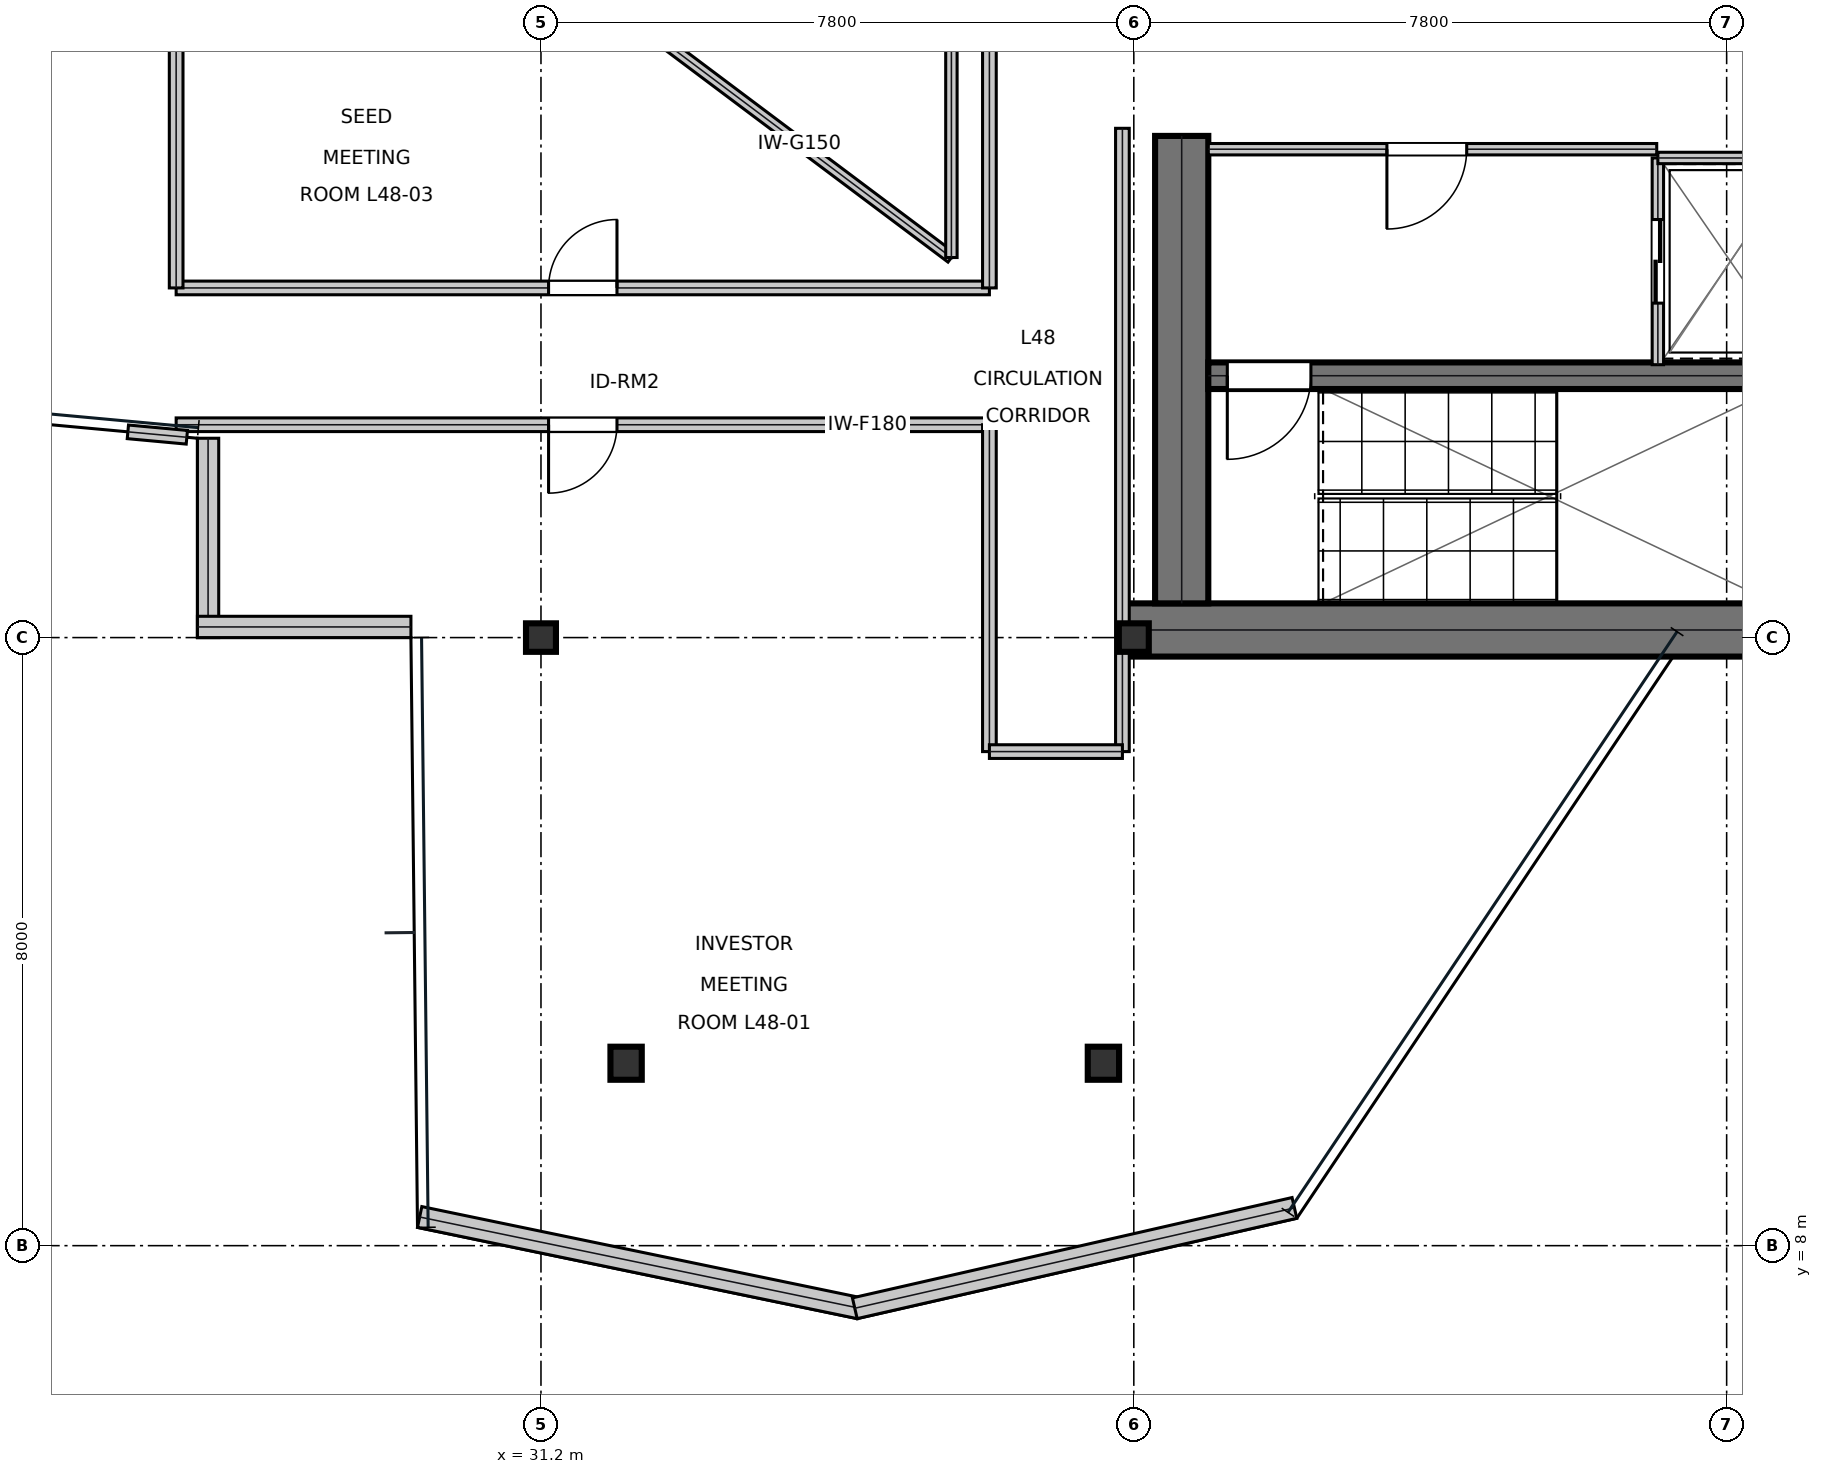
"""IFC4 building model, lengths in metres.
Left out: names, types, materials, properties, quantities, classifications, styles, units other than length and angle.
Written with IfcOpenShell. Run it as: python <this file> out.ifc"""

import sys

from ifc_helpers import new_model, si_unit, direction, frame, frame_2d, origin, origin_2d, place, context, subcontext, project, spatial, rectangle, i_section, extrude, element, fill, save


model = new_model("IFC4")
c1 = context("Model", 3, precision=1e-05, world=origin(), true_north=direction((0.0, 1.0)))
c2 = subcontext(c1, "Body", "Model", "MODEL_VIEW")
j1 = project(units=[si_unit("LENGTHUNIT", "METRE"), si_unit("PLANEANGLEUNIT", "RADIAN")], contexts=[c1])
p1 = place(None, origin())
s1 = spatial("IfcSite", under=j1, at=p1, CompositionType="ELEMENT")
p2 = place(p1, origin())
s2 = spatial("IfcBuilding", under=s1, at=p2, CompositionType="ELEMENT")
p3 = place(p2, frame((0.0, 0.0, 208.05)))
s3 = spatial("IfcBuildingStorey", under=s2, at=p3, CompositionType="ELEMENT", Elevation=208.05)
p4 = place(p3, frame((38.8, 16.1, 0.0), z_axis=(0.0, 0.0, 1.0), x_axis=(1.0, 0.0, 0.0)))
e1 = element("IfcWall", 1, at=p4, inside=s3, PredefinedType="SHEAR", context=c2, shape_type="SweptSolid", body=[
    extrude(rectangle(XDim=16.0, YDim=0.7, at=frame_2d((8.0, 0.0))), origin(), (0.0, 0.0, 1.0), 3.79),
])
p5 = place(p3, frame((39.63, 16.45, 0.0), z_axis=(0.0, 0.0, 1.0), x_axis=(0.0, 1.0, 0.0)))
e2 = element("IfcWall", 2, at=p5, inside=s3, PredefinedType="SHEAR", context=c2, shape_type="SweptSolid", body=[
    extrude(rectangle(XDim=6.15, YDim=0.7, at=frame_2d((3.075, 0.0))), origin(), (0.0, 0.0, 1.0), 3.79),
])
p6 = place(p3, frame((39.98, 19.445, 0.0), z_axis=(0.0, 0.0, 1.0), x_axis=(1.0, 0.0, 0.0)))
e3 = element("IfcWall", 3, at=p6, inside=s3, PredefinedType="SHEAR", context=c2, shape_type="SweptSolid", body=[
    extrude(rectangle(XDim=7.71, YDim=0.35, at=frame_2d((3.855, 0.0))), origin(), (0.0, 0.0, 1.0), 3.79),
])
p7 = place(p6, frame((0.25, 0.0, 0.0)))
e4 = element("IfcOpeningElement", 4, at=p7, cuts=e3, PredefinedType="OPENING", context=c2, shape_type="SweptSolid", body=[
    extrude(rectangle(XDim=1.1, YDim=2.15, at=frame_2d((0.55, 1.075))), frame((0.0, 0.185, 0.0), z_axis=(0.0, -1.0, 0.0), x_axis=(1.0, 0.0, 0.0)), (0.0, 0.0, 1.0), 0.37),
])
for number, where, z_axis, x_axis in (
    (5, (31.2, 16.0, 0.0), (0.0, 0.0, 1.0), (1.0, 0.0, 0.0)),
    (6, (39.0, 16.0, 0.0), (0.0, 0.0, 1.0), (1.0, 0.0, 0.0)),
):
    element("IfcColumn", number, at=place(p3, frame(where, z_axis=z_axis, x_axis=x_axis)), inside=s3, PredefinedType="COLUMN", context=c2, shape_type="SweptSolid", body=[
        extrude(i_section(OverallWidth=0.394, OverallDepth=0.375, WebThickness=0.017, FlangeThickness=0.028, at=origin_2d()), origin(), (0.0, 0.0, 1.0), 4.044),
    ])
for number, where, z_axis, x_axis in (
    (7, (32.32, 10.4, 0.016), (0.0, 0.0, 1.0), (1.0, 0.0, 0.0)),
    (8, (38.6, 10.4, 0.016), (0.0, 0.0, 1.0), (1.0, 0.0, 0.0)),
):
    element("IfcColumn", number, at=place(p3, frame(where, z_axis=z_axis, x_axis=x_axis)), inside=s3, PredefinedType="COLUMN", context=c2, shape_type="SweptSolid", body=[
        extrude(i_section(OverallWidth=0.412, OverallDepth=0.435, WebThickness=0.036, FlangeThickness=0.058, at=origin_2d()), origin(), (0.0, 0.0, 1.0), 4.018),
    ])
p8 = place(p3, frame((26.82, 18.622, 0.0), z_axis=(0.0, 0.0, 1.0), x_axis=(0.0, -1.0, 0.0)))
e9 = element("IfcWall", 9, at=p8, inside=s3, PredefinedType="STANDARD", context=c2, shape_type="SweptSolid", body=[
    extrude(rectangle(XDim=2.622, YDim=0.28, at=frame_2d((1.311, 0.0))), origin(), (0.0, 0.0, 1.0), 3.319),
])
p9 = place(p3, frame((26.68, 16.14, 0.0), z_axis=(0.0, 0.0, 1.0), x_axis=(1.0, 0.0, 0.0)))
e10 = element("IfcWall", 10, at=p9, inside=s3, PredefinedType="STANDARD", context=c2, shape_type="SweptSolid", body=[
    extrude(rectangle(XDim=2.809, YDim=0.28, at=frame_2d((1.405, 0.0))), origin(), (0.0, 0.0, 1.0), 3.79),
])
p10 = place(p3, frame((29.604, 8.377, 0.0), z_axis=(0.0, 0.0, 1.0), x_axis=(0.979145472124, -0.203160390873, 0.0)))
e11 = element("IfcWall", 11, at=p10, inside=s3, PredefinedType="STANDARD", context=c2, shape_type="SweptSolid", body=[
    extrude(rectangle(XDim=5.908, YDim=0.28, at=frame_2d((2.954, 0.0))), origin(), (0.0, 0.0, 1.0), 3.79),
])
p11 = place(p3, frame((35.329, 7.177, 0.0), z_axis=(0.0, 0.0, 1.0), x_axis=(0.974934808954, 0.222490715064, 0.0)))
e12 = element("IfcWall", 12, at=p11, inside=s3, PredefinedType="STANDARD", context=c2, shape_type="SweptSolid", body=[
    extrude(rectangle(XDim=5.933, YDim=0.28, at=frame_2d((2.967, 0.0))), origin(), (0.0, 0.0, 1.0), 3.79),
])
p12 = place(p3, frame((39.98, 22.425, 0.0), z_axis=(0.0, 0.0, 1.0), x_axis=(1.0, 0.0, 0.0)))
e13 = element("IfcWall", 13, at=p12, inside=s3, PredefinedType="PARTITIONING", context=c2, shape_type="SweptSolid", body=[
    extrude(rectangle(XDim=5.9, YDim=0.15, at=frame_2d((2.95, 0.0))), origin(), (0.0, 0.0, 1.0), 3.79),
])
p13 = place(p12, frame((2.35, 0.0, 0.0)))
e14 = element("IfcOpeningElement", 14, at=p13, cuts=e13, PredefinedType="OPENING", context=c2, shape_type="SweptSolid", body=[
    extrude(rectangle(XDim=1.05, YDim=2.15, at=frame_2d((0.525, 1.075))), frame((0.0, 0.085, 0.0), z_axis=(0.0, -1.0, 0.0), x_axis=(1.0, 0.0, 0.0)), (0.0, 0.0, 1.0), 0.17),
])
p14 = place(p3, frame((45.895, 19.59, 0.0), z_axis=(0.0, 0.0, 1.0), x_axis=(0.0, 1.0, 0.0)))
e15 = element("IfcWall", 15, at=p14, inside=s3, PredefinedType="PARTITIONING", context=c2, shape_type="SweptSolid", body=[
    extrude(rectangle(XDim=2.72, YDim=0.15, at=frame_2d((1.36, 0.0))), origin(), (0.0, 0.0, 1.0), 3.79),
])
p15 = place(p14, frame((0.81, 0.0, 0.0)))
e16 = element("IfcOpeningElement", 16, at=p15, cuts=e15, PredefinedType="OPENING", context=c2, shape_type="SweptSolid", body=[
    extrude(rectangle(XDim=1.1, YDim=2.15, at=frame_2d((0.55, 1.075))), frame((0.0, 0.085, 0.0), z_axis=(0.0, -1.0, 0.0), x_axis=(1.0, 0.0, 0.0)), (0.0, 0.0, 1.0), 0.17),
])
p16 = place(p3, frame((45.895, 22.31, 0.0), z_axis=(0.0, 0.0, 1.0), x_axis=(1.0, 0.0, 0.0)))
e17 = element("IfcWall", 17, at=p16, inside=s3, PredefinedType="PARTITIONING", context=c2, shape_type="SweptSolid", body=[
    extrude(rectangle(XDim=1.915, YDim=0.15, at=frame_2d((0.958, 0.0))), origin(), (0.0, 0.0, 1.0), 3.79),
])
p17 = place(p3, frame((26.4, 18.8, 0.0), z_axis=(0.0, 0.0, 1.0), x_axis=(1.0, 0.0, 0.0)))
e18 = element("IfcWall", 18, at=p17, inside=s3, PredefinedType="SOLIDWALL", context=c2, shape_type="SweptSolid", body=[
    extrude(rectangle(XDim=10.7, YDim=0.18, at=frame_2d((5.35, 0.0))), origin(), (0.0, 0.0, 1.0), 3.241),
])
p18 = place(p17, frame((4.9, 0.0, 0.0)))
e19 = element("IfcOpeningElement", 19, at=p18, cuts=e18, PredefinedType="OPENING", context=c2, shape_type="SweptSolid", body=[
    extrude(rectangle(XDim=0.9, YDim=2.15, at=frame_2d((0.45, 1.075))), frame((0.0, 0.1, 0.0), z_axis=(0.0, -1.0, 0.0), x_axis=(1.0, 0.0, 0.0)), (0.0, 0.0, 1.0), 0.2),
])
p19 = place(p3, frame((26.4, 20.6, 0.0), z_axis=(0.0, 0.0, 1.0), x_axis=(1.0, 0.0, 0.0)))
e20 = element("IfcWall", 20, at=p19, inside=s3, PredefinedType="SOLIDWALL", context=c2, shape_type="SweptSolid", body=[
    extrude(rectangle(XDim=10.7, YDim=0.18, at=frame_2d((5.35, 0.0))), origin(), (0.0, 0.0, 1.0), 3.241),
])
p20 = place(p19, frame((4.9, 0.0, 0.0)))
e21 = element("IfcOpeningElement", 21, at=p20, cuts=e20, PredefinedType="OPENING", context=c2, shape_type="SweptSolid", body=[
    extrude(rectangle(XDim=0.9, YDim=2.15, at=frame_2d((0.45, 1.075))), frame((0.0, 0.1, 0.0), z_axis=(0.0, -1.0, 0.0), x_axis=(1.0, 0.0, 0.0)), (0.0, 0.0, 1.0), 0.2),
])
p21 = place(p3, frame((38.85, 14.5, 0.0), z_axis=(0.0, 0.0, 1.0), x_axis=(0.0, 1.0, 0.0)))
e22 = element("IfcWall", 22, at=p21, inside=s3, PredefinedType="SOLIDWALL", context=c2, shape_type="SweptSolid", body=[
    extrude(rectangle(XDim=8.2, YDim=0.18, at=frame_2d((4.1, 0.0))), origin(), (0.0, 0.0, 1.0), 3.241),
])
p22 = place(p3, frame((37.1, 14.5, 0.0), z_axis=(0.0, 0.0, 1.0), x_axis=(0.0, 1.0, 0.0)))
e23 = element("IfcWall", 23, at=p22, inside=s3, PredefinedType="SOLIDWALL", context=c2, shape_type="SweptSolid", body=[
    extrude(rectangle(XDim=4.3, YDim=0.18, at=frame_2d((2.15, 0.0))), origin(), (0.0, 0.0, 1.0), 3.241),
])
p23 = place(p3, frame((37.1, 14.5, 0.0), z_axis=(0.0, 0.0, 1.0), x_axis=(1.0, 0.0, 0.0)))
e24 = element("IfcWall", 24, at=p23, inside=s3, PredefinedType="SOLIDWALL", context=c2, shape_type="SweptSolid", body=[
    extrude(rectangle(XDim=1.75, YDim=0.18, at=frame_2d((0.875, 0.0))), origin(), (0.0, 0.0, 1.0), 3.241),
])
p24 = place(p3, frame((25.765, 18.707, 0.0), z_axis=(0.0, 0.0, 1.0), x_axis=(0.995774178655, -0.091835641909, 0.0)))
e25 = element("IfcWall", 25, at=p24, inside=s3, PredefinedType="SOLIDWALL", context=c2, shape_type="SweptSolid", body=[
    extrude(rectangle(XDim=0.779, YDim=0.18, at=frame_2d((0.389, 0.0))), origin(), (0.0, 0.0, 1.0), 3.79),
])
p25 = place(p3, frame((26.4, 20.6, 0.0), z_axis=(0.0, 0.0, 1.0), x_axis=(0.0, 1.0, 0.0)))
e26 = element("IfcWall", 26, at=p25, inside=s3, PredefinedType="SOLIDWALL", context=c2, shape_type="SweptSolid", body=[
    extrude(rectangle(XDim=4.078, YDim=0.18, at=frame_2d((2.039, 0.0))), origin(), (0.0, 0.0, 1.0), 3.241),
])
p26 = place(p3, frame((37.1, 20.6, 0.0), z_axis=(0.0, 0.0, 1.0), x_axis=(0.0, 1.0, 0.0)))
e27 = element("IfcWall", 27, at=p26, inside=s3, PredefinedType="SOLIDWALL", context=c2, shape_type="SweptSolid", body=[
    extrude(rectangle(XDim=4.078, YDim=0.18, at=frame_2d((2.039, 0.0))), origin(), (0.0, 0.0, 1.0), 3.79),
])
p27 = place(p3, frame((32.6, 24.0, 0.0), z_axis=(0.0, 0.0, 1.0), x_axis=(0.8, -0.6, 0.0)))
e28 = element("IfcWall", 28, at=p27, inside=s3, PredefinedType="MOVABLE", context=c2, shape_type="SweptSolid", body=[
    extrude(rectangle(XDim=5.0, YDim=0.15, at=frame_2d((2.5, 0.0))), origin(), (0.0, 0.0, 1.0), 3.79),
])
p28 = place(p3, frame((36.6, 21.0, 0.0), z_axis=(0.0, 0.0, 1.0), x_axis=(0.0, 1.0, 0.0)))
e29 = element("IfcWall", 29, at=p28, inside=s3, PredefinedType="MOVABLE", context=c2, shape_type="SweptSolid", body=[
    extrude(rectangle(XDim=6.0, YDim=0.15, at=frame_2d((3.0, 0.0))), origin(), (0.0, 0.0, 1.0), 3.79),
])
p29 = place(p13, frame((1.05, 0.0, 0.0), z_axis=(0.0, 0.0, 1.0), x_axis=(-1.0, 0.0, 0.0)))
e30 = element("IfcDoor", 30, at=p29, inside=s3, OperationType="SINGLE_SWING_RIGHT", PredefinedType="DOOR", context=c2, shape_type="SweptSolid", body=[
    extrude(rectangle(XDim=1.05, YDim=2.15, at=frame_2d((0.525, 1.075))), frame((0.0, 0.025, 0.0), z_axis=(0.0, -1.0, 0.0), x_axis=(1.0, 0.0, 0.0)), (0.0, 0.0, 1.0), 0.05),
])
fill(e14, e30)
p30 = place(p15, frame((1.1, 0.0, 0.0), z_axis=(0.0, 0.0, 1.0), x_axis=(-1.0, 0.0, 0.0)))
e31 = element("IfcDoor", 31, at=p30, inside=s3, OperationType="DOUBLE_DOOR_SLIDING", PredefinedType="DOOR", context=c2, shape_type="SweptSolid", body=[
    extrude(rectangle(XDim=1.1, YDim=2.15, at=frame_2d((0.55, 1.075))), frame((0.0, 0.025, 0.0), z_axis=(0.0, -1.0, 0.0), x_axis=(1.0, 0.0, 0.0)), (0.0, 0.0, 1.0), 0.05),
])
fill(e16, e31)
p31 = place(p18, frame((0.9, 0.0, 0.0), z_axis=(0.0, 0.0, 1.0), x_axis=(-1.0, 0.0, 0.0)))
e32 = element("IfcDoor", 32, at=p31, inside=s3, OperationType="SINGLE_SWING_RIGHT", PredefinedType="DOOR", context=c2, shape_type="SweptSolid", body=[
    extrude(rectangle(XDim=0.9, YDim=2.15, at=frame_2d((0.45, 1.075))), frame((0.0, 0.025, 0.0), z_axis=(0.0, -1.0, 0.0), x_axis=(1.0, 0.0, 0.0)), (0.0, 0.0, 1.0), 0.05),
])
fill(e19, e32)
p32 = place(p20, origin())
e33 = element("IfcDoor", 33, at=p32, inside=s3, OperationType="SINGLE_SWING_RIGHT", PredefinedType="DOOR", context=c2, shape_type="SweptSolid", body=[
    extrude(rectangle(XDim=0.9, YDim=2.15, at=frame_2d((0.45, 1.075))), frame((0.0, 0.025, 0.0), z_axis=(0.0, -1.0, 0.0), x_axis=(1.0, 0.0, 0.0)), (0.0, 0.0, 1.0), 0.05),
])
fill(e21, e33)
p33 = place(p7, frame((1.1, 0.0, 0.0), z_axis=(0.0, 0.0, 1.0), x_axis=(-1.0, 0.0, 0.0)))
e34 = element("IfcDoor", 34, at=p33, inside=s3, OperationType="SINGLE_SWING_RIGHT", PredefinedType="DOOR", context=c2, shape_type="SweptSolid", body=[
    extrude(rectangle(XDim=1.1, YDim=2.15, at=frame_2d((0.55, 1.075))), frame((0.0, 0.025, 0.0), z_axis=(0.0, -1.0, 0.0), x_axis=(1.0, 0.0, 0.0)), (0.0, 0.0, 1.0), 0.05),
])
fill(e4, e34)
save(model, sys.argv[1])
